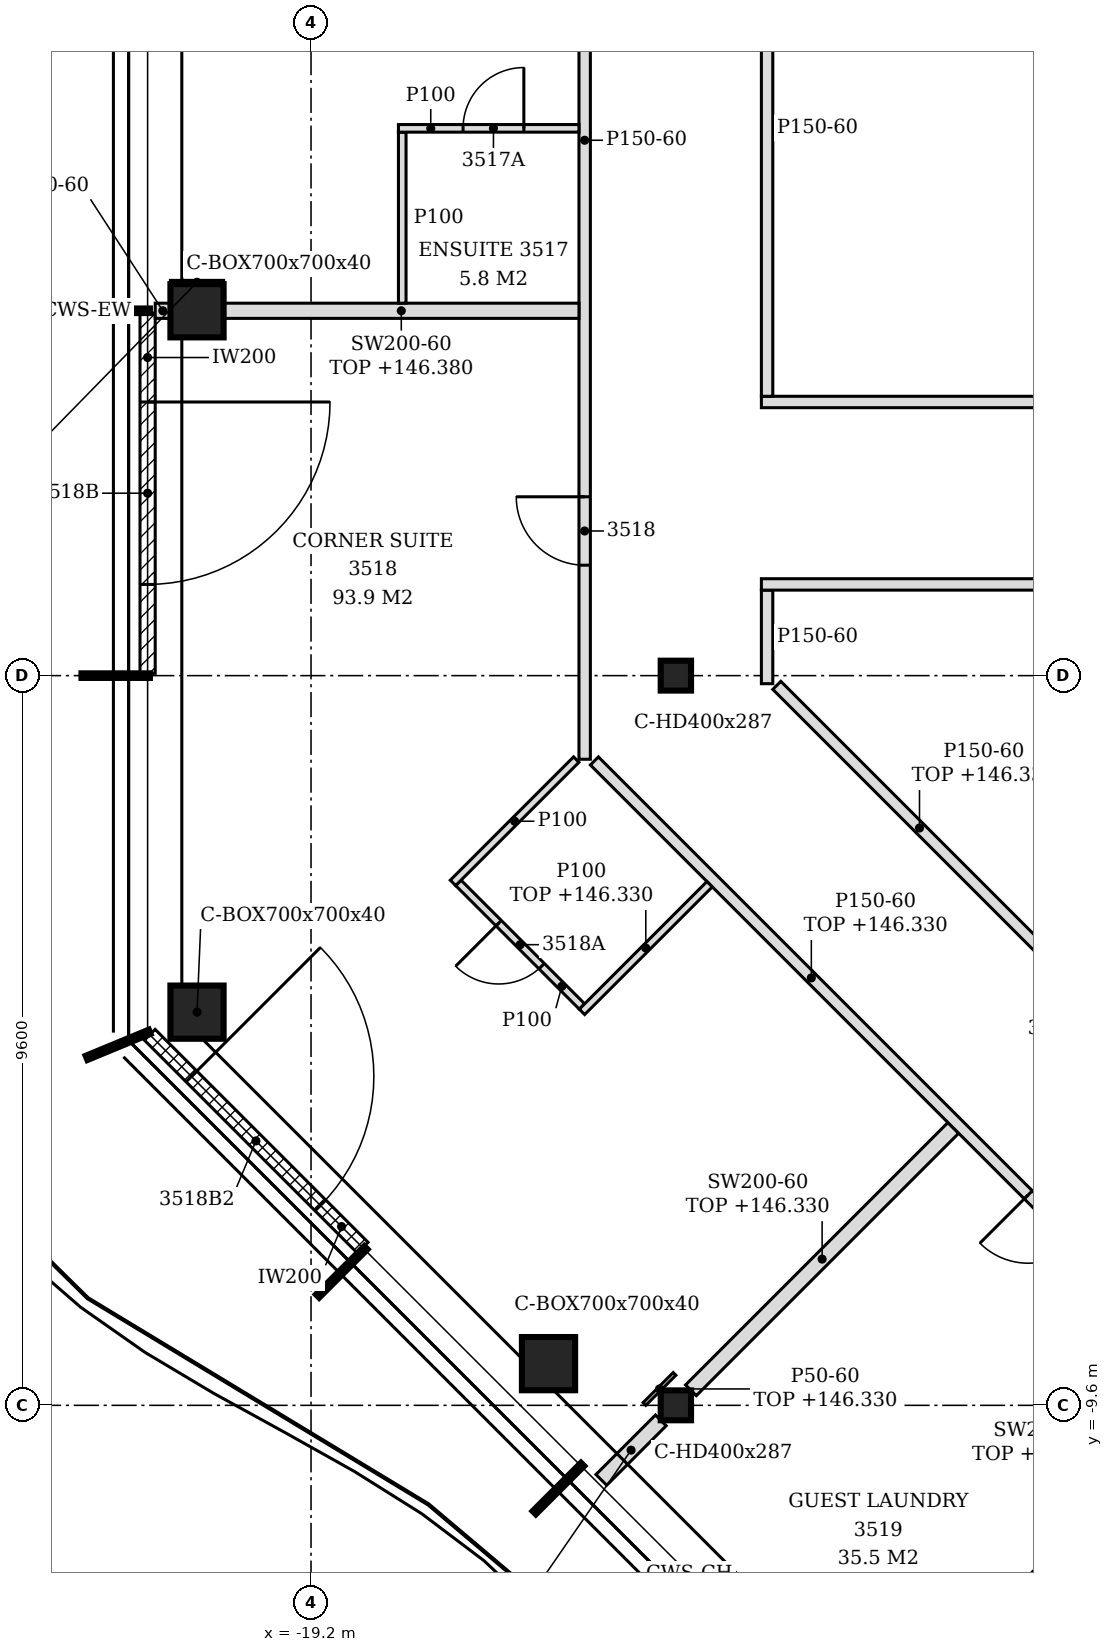
"""IFC4 building model, lengths in metres.
Left out: names, types, materials, properties, quantities, classifications, styles, units other than length and angle.
Written with IfcOpenShell. Run it as: python <this file> out.ifc"""

import sys

from ifc_helpers import new_model, si_unit, direction, frame, frame_2d, origin, origin_2d, place, context, subcontext, project, spatial, polyline, rectangle, hollow_rectangle, i_section, outline, extrude, element, fill, save


model = new_model("IFC4")
c1 = context("Model", 3, precision=1e-05, world=origin(), true_north=direction((0.0, 1.0)))
c2 = subcontext(c1, "Body", "Model", "MODEL_VIEW")
j1 = project(units=[si_unit("LENGTHUNIT", "METRE"), si_unit("PLANEANGLEUNIT", "RADIAN")], contexts=[c1])
p1 = place(None, origin())
s1 = spatial("IfcSite", under=j1, at=p1, CompositionType="ELEMENT")
p2 = place(p1, origin())
s2 = spatial("IfcBuilding", under=s1, at=p2, CompositionType="ELEMENT")
p3 = place(p2, frame((0.0, 0.0, 143.4)))
s3 = spatial("IfcBuildingStorey", under=s2, at=p3, CompositionType="ELEMENT", Elevation=143.4)
for number, where, z_axis, x_axis in (
    (1, (-20.7, 4.8, -0.15), (0.0, 0.0, 1.0), (1.0, 0.0, 0.0)),
    (2, (-20.7, -4.427, -0.15), (0.0, 0.0, 1.0), (1.0, 0.0, 0.0)),
    (3, (-16.076, -9.052, -0.15), (0.0, 0.0, 1.0), (1.0, 0.0, 0.0)),
):
    element("IfcColumn", number, at=place(p3, frame(where, z_axis=z_axis, x_axis=x_axis)), inside=s3, PredefinedType="COLUMN", context=c2, shape_type="SweptSolid", body=[
        extrude(hollow_rectangle(XDim=0.7, YDim=0.7, WallThickness=0.04, at=origin_2d()), origin(), (0.0, 0.0, 1.0), 3.6),
    ])
for number, where, z_axis, x_axis in (
    (4, (-14.4, -9.6, -0.15), (0.0, 0.0, 1.0), (1.0, 0.0, 0.0)),
    (5, (-14.4, 0.0, -0.15), (0.0, 0.0, 1.0), (1.0, 0.0, 0.0)),
):
    element("IfcColumn", number, at=place(p3, frame(where, z_axis=z_axis, x_axis=x_axis)), inside=s3, PredefinedType="COLUMN", context=c2, shape_type="SweptSolid", body=[
        extrude(i_section(OverallWidth=0.399, OverallDepth=0.393, WebThickness=0.023, FlangeThickness=0.037, FilletRadius=0.015, at=origin_2d()), origin(), (0.0, 0.0, 1.0), 3.6),
    ])
p4 = place(p3, frame((-21.35, 4.77, 0.0), z_axis=(0.0, 0.0, 1.0), x_axis=(0.0, -1.0, 0.0)))
e6 = element("IfcWall", 6, at=p4, inside=s3, PredefinedType="NOTDEFINED", context=c2, shape_type="SweptSolid", body=[
    extrude(rectangle(XDim=4.74, YDim=0.2, at=frame_2d((2.37, 0.0))), origin(), (0.0, 0.0, 1.0), 3.45),
])
p5 = place(p4, frame((1.17, 0.0, 0.0)))
e7 = element("IfcOpeningElement", 7, at=p5, cuts=e6, PredefinedType="OPENING", context=c2, shape_type="SweptSolid", body=[
    extrude(rectangle(XDim=2.4, YDim=2.4, at=frame_2d((1.2, 1.2))), frame((0.0, 0.11, 0.0), z_axis=(0.0, -1.0, 0.0), x_axis=(1.0, 0.0, 0.0)), (0.0, 0.0, 1.0), 0.22),
])
p6 = place(p3, frame((-21.322, -4.725, 0.0), z_axis=(0.0, 0.0, 1.0), x_axis=(0.707106781187, -0.707106781187, 0.0)))
e8 = element("IfcWall", 8, at=p6, inside=s3, PredefinedType="NOTDEFINED", context=c2, shape_type="SweptSolid", body=[
    extrude(rectangle(XDim=3.962, YDim=0.2, at=frame_2d((1.981, 0.0))), origin(), (0.0, 0.0, 1.0), 3.45),
])
p7 = place(p6, frame((0.775, 0.0, 0.0)))
e9 = element("IfcOpeningElement", 9, at=p7, cuts=e8, PredefinedType="OPENING", context=c2, shape_type="SweptSolid", body=[
    extrude(rectangle(XDim=2.4, YDim=2.4, at=frame_2d((1.2, 1.2))), frame((0.0, 0.11, 0.0), z_axis=(0.0, -1.0, 0.0), x_axis=(1.0, 0.0, 0.0)), (0.0, 0.0, 1.0), 0.22),
])
p8 = place(p3, frame((-11.102, -13.326, 0.0), z_axis=(0.0, 0.0, 1.0), x_axis=(0.707088722709, 0.707124839203, 0.0)))
e10 = element("IfcWall", 10, at=p8, inside=s3, PredefinedType="PARTITIONING", context=c2, shape_type="SweptSolid", body=[
    extrude(rectangle(XDim=6.76, YDim=0.2, at=frame_2d((3.38, 0.0))), origin(), (0.0, 0.0, 1.0), 2.93),
])
p9 = place(p3, frame((-15.381, -10.581, 0.0), z_axis=(0.0, 0.0, 1.0), x_axis=(0.707217034054, 0.706996511125, 0.0)))
e11 = element("IfcWall", 11, at=p9, inside=s3, PredefinedType="PARTITIONING", context=c2, shape_type="SweptSolid", body=[
    extrude(rectangle(XDim=1.107, YDim=0.2, at=frame_2d((0.554, 0.0))), origin(), (0.0, 0.0, 1.0), 2.63),
])
p10 = place(p3, frame((-14.202, -9.402, 0.0), z_axis=(0.0, 0.0, 1.0), x_axis=(0.707081776084, 0.707131785404, 0.0)))
e12 = element("IfcWall", 12, at=p10, inside=s3, PredefinedType="PARTITIONING", context=c2, shape_type="SweptSolid", body=[
    extrude(rectangle(XDim=4.882, YDim=0.2, at=frame_2d((2.441, 0.0))), origin(), (0.0, 0.0, 1.0), 2.93),
])
p11 = place(p3, frame((-8.322, -8.272, 0.0), z_axis=(0.0, 0.0, 1.0), x_axis=(-0.707106781187, 0.707106781187, 0.0)))
e13 = element("IfcWall", 13, at=p11, inside=s3, PredefinedType="PARTITIONING", context=c2, shape_type="SweptSolid", body=[
    extrude(rectangle(XDim=10.112, YDim=0.15, at=frame_2d((5.056, 0.0))), origin(), (0.0, 0.0, 1.0), 2.93),
])
p12 = place(p11, frame((1.139, 0.0, 0.0)))
e14 = element("IfcOpeningElement", 14, at=p12, cuts=e13, PredefinedType="OPENING", context=c2, shape_type="SweptSolid", body=[
    extrude(rectangle(XDim=0.9, YDim=2.1, at=frame_2d((0.45, 1.05))), frame((0.0, 0.085, 0.0), z_axis=(0.0, -1.0, 0.0), x_axis=(1.0, 0.0, 0.0)), (0.0, 0.0, 1.0), 0.17),
])
p13 = place(p3, frame((-5.009, -8.191, 0.0), z_axis=(0.0, 0.0, 1.0), x_axis=(-0.707106781187, 0.707106781187, 0.0)))
e15 = element("IfcWall", 15, at=p13, inside=s3, PredefinedType="PARTITIONING", context=c2, shape_type="SweptSolid", body=[
    extrude(rectangle(XDim=11.404, YDim=0.15, at=frame_2d((5.702, 0.0))), origin(), (0.0, 0.0, 1.0), 2.93),
])
p14 = place(p13, frame((5.195, 0.0, 0.0)))
e16 = element("IfcOpeningElement", 16, at=p14, cuts=e15, PredefinedType="OPENING", context=c2, shape_type="SweptSolid", body=[
    extrude(rectangle(XDim=0.9, YDim=2.1, at=frame_2d((0.45, 1.05))), frame((0.0, 0.085, 0.0), z_axis=(0.0, -1.0, 0.0), x_axis=(1.0, 0.0, 0.0)), (0.0, 0.0, 1.0), 0.17),
])
p15 = place(p3, frame((-15.635, -4.353, 0.0), z_axis=(0.0, 0.0, 1.0), x_axis=(-0.707106781187, 0.707106781187, 0.0)))
e17 = element("IfcWall", 17, at=p15, inside=s3, PredefinedType="PARTITIONING", context=c2, shape_type="SweptSolid", body=[
    extrude(rectangle(XDim=2.3, YDim=0.1, at=frame_2d((1.15, 0.0))), origin(), (0.0, 0.0, 1.0), 3.45),
])
p16 = place(p15, frame((0.75, 0.0, 0.0)))
e18 = element("IfcOpeningElement", 18, at=p16, cuts=e17, PredefinedType="OPENING", context=c2, shape_type="SweptSolid", body=[
    extrude(rectangle(XDim=0.8, YDim=2.1, at=frame_2d((0.4, 1.05))), frame((0.0, 0.06, 0.0), z_axis=(0.0, -1.0, 0.0), x_axis=(1.0, 0.0, 0.0)), (0.0, 0.0, 1.0), 0.12),
])
p17 = place(p3, frame((-15.635, -4.423, 0.0), z_axis=(0.0, 0.0, 1.0), x_axis=(0.707106781187, 0.707106781187, 0.0)))
e19 = element("IfcWall", 19, at=p17, inside=s3, PredefinedType="PARTITIONING", context=c2, shape_type="SweptSolid", body=[
    extrude(rectangle(XDim=2.375, YDim=0.1, at=frame_2d((1.188, 0.0))), origin(), (0.0, 0.0, 1.0), 2.93),
])
p18 = place(p3, frame((-17.333, -2.726, 0.0), z_axis=(0.0, 0.0, 1.0), x_axis=(0.707159989116, 0.707053569253, 0.0)))
e20 = element("IfcWall", 20, at=p18, inside=s3, PredefinedType="PARTITIONING", context=c2, shape_type="SweptSolid", body=[
    extrude(rectangle(XDim=2.294, YDim=0.1, at=frame_2d((1.147, 0.0))), origin(), (0.0, 0.0, 1.0), 3.45),
])
p19 = place(p3, frame((-15.6, -1.1, 0.0), z_axis=(0.0, 0.0, 1.0), x_axis=(0.0, 1.0, 0.0)))
e21 = element("IfcWall", 21, at=p19, inside=s3, PredefinedType="PARTITIONING", context=c2, shape_type="SweptSolid", body=[
    extrude(outline(polyline([(0.0, 0.0), (12.834, 0.0), (12.834, 3.45), (10.795, 3.45), (10.793, 2.98), (10.605, 2.98), (10.603, 3.45), (5.995, 3.45), (5.993, 2.98), (5.805, 2.98), (5.803, 3.45), (1.195, 3.45), (1.193, 2.98), (1.005, 2.98), (1.003, 3.45), (0.0, 3.45), (0.0, 0.0)])), frame((0.0, 0.075, 0.0), z_axis=(0.0, -1.0, 0.0), x_axis=(1.0, 0.0, 0.0)), (0.0, 0.0, 1.0), 0.15),
])
p20 = place(p19, frame((2.553, 0.0, 0.0)))
e22 = element("IfcOpeningElement", 22, at=p20, cuts=e21, PredefinedType="OPENING", context=c2, shape_type="SweptSolid", body=[
    extrude(rectangle(XDim=0.9, YDim=2.1, at=frame_2d((0.45, 1.05))), frame((0.0, 0.085, 0.0), z_axis=(0.0, -1.0, 0.0), x_axis=(1.0, 0.0, 0.0)), (0.0, 0.0, 1.0), 0.17),
])
p21 = place(p3, frame((-13.2, -0.106, 0.0), z_axis=(0.0, 0.0, 1.0), x_axis=(0.0, 1.0, 0.0)))
e23 = element("IfcWall", 23, at=p21, inside=s3, PredefinedType="PARTITIONING", context=c2, shape_type="SweptSolid", body=[
    extrude(outline(polyline([(0.0, 0.0), (1.231, 0.0), (1.231, 3.45), (0.206, 3.45), (0.204, 2.93), (0.006, 2.93), (0.004, 3.45), (0.0, 3.45), (0.0, 0.0)])), frame((0.0, 0.075, 0.0), z_axis=(0.0, -1.0, 0.0), x_axis=(1.0, 0.0, 0.0)), (0.0, 0.0, 1.0), 0.15),
])
for number, where, z_axis, x_axis in (
    (24, (-13.275, 1.2, 0.0), (0.0, 0.0, 1.0), (1.0, 0.0, 0.0)),
    (25, (-13.275, 3.6, 0.0), (0.0, 0.0, 1.0), (1.0, 0.0, 0.0)),
):
    element("IfcWall", number, at=place(p3, frame(where, z_axis=z_axis, x_axis=x_axis)), inside=s3, PredefinedType="PARTITIONING", context=c2, shape_type="SweptSolid", body=[
        extrude(outline(polyline([(0.0, 0.0), (8.55, 0.0), (8.55, 2.83), (8.325, 2.83), (8.323, 3.45), (0.0, 3.45), (0.0, 0.0)])), frame((0.0, 0.075, 0.0), z_axis=(0.0, -1.0, 0.0), x_axis=(1.0, 0.0, 0.0)), (0.0, 0.0, 1.0), 0.15),
    ])
p22 = place(p3, frame((-13.2, 3.675, 0.0), z_axis=(0.0, 0.0, 1.0), x_axis=(0.0, 1.0, 0.0)))
e26 = element("IfcWall", 26, at=p22, inside=s3, PredefinedType="PARTITIONING", context=c2, shape_type="SweptSolid", body=[
    extrude(outline(polyline([(0.0, 0.0), (7.065, 0.0), (7.065, 3.45), (6.025, 3.45), (6.023, 2.93), (5.825, 2.93), (5.823, 3.45), (1.225, 3.45), (1.223, 2.93), (1.025, 2.93), (1.023, 3.45), (0.0, 3.45), (0.0, 0.0)])), frame((0.0, 0.075, 0.0), z_axis=(0.0, -1.0, 0.0), x_axis=(1.0, 0.0, 0.0)), (0.0, 0.0, 1.0), 0.15),
])
p23 = place(p3, frame((-21.25, 4.8, 0.0), z_axis=(0.0, 0.0, 1.0), x_axis=(1.0, 0.0, 0.0)))
e27 = element("IfcWall", 27, at=p23, inside=s3, PredefinedType="PARTITIONING", context=c2, shape_type="SweptSolid", body=[
    extrude(rectangle(XDim=0.2, YDim=0.2, at=frame_2d((0.1, 0.0))), origin(), (0.0, 0.0, 1.0), 3.45),
])
p24 = place(p3, frame((-20.35, 4.8, 0.0), z_axis=(0.0, 0.0, 1.0), x_axis=(1.0, 0.0, 0.0)))
e28 = element("IfcWall", 28, at=p24, inside=s3, PredefinedType="PARTITIONING", context=c2, shape_type="SweptSolid", body=[
    extrude(rectangle(XDim=4.675, YDim=0.2, at=frame_2d((2.337, 0.0))), origin(), (0.0, 0.0, 1.0), 2.98),
])
p25 = place(p3, frame((-18.0, 4.9, 0.0), z_axis=(0.0, 0.0, 1.0), x_axis=(0.0, 1.0, 0.0)))
e29 = element("IfcWall", 29, at=p25, inside=s3, PredefinedType="PARTITIONING", context=c2, shape_type="SweptSolid", body=[
    extrude(rectangle(XDim=2.25, YDim=0.1, at=frame_2d((1.125, 0.0))), origin(), (0.0, 0.0, 1.0), 3.45),
])
p26 = place(p3, frame((-18.05, 7.2, 0.0), z_axis=(0.0, 0.0, 1.0), x_axis=(1.0, 0.0, 0.0)))
e30 = element("IfcWall", 30, at=p26, inside=s3, PredefinedType="PARTITIONING", context=c2, shape_type="SweptSolid", body=[
    extrude(rectangle(XDim=2.375, YDim=0.1, at=frame_2d((1.188, 0.0))), origin(), (0.0, 0.0, 1.0), 3.45),
])
p27 = place(p26, frame((0.85, 0.0, 0.0)))
e31 = element("IfcOpeningElement", 31, at=p27, cuts=e30, PredefinedType="OPENING", context=c2, shape_type="SweptSolid", body=[
    extrude(rectangle(XDim=0.8, YDim=2.1, at=frame_2d((0.4, 1.05))), frame((0.0, 0.06, 0.0), z_axis=(0.0, -1.0, 0.0), x_axis=(1.0, 0.0, 0.0)), (0.0, 0.0, 1.0), 0.12),
])
p28 = place(p3, frame((-14.814, -9.582, 0.0), z_axis=(0.0, 0.0, 1.0), x_axis=(0.707106781187, 0.707106781187, 0.0)))
e32 = element("IfcWall", 32, at=p28, inside=s3, PredefinedType="PARTITIONING", context=c2, shape_type="SweptSolid", body=[
    extrude(rectangle(XDim=0.56, YDim=0.05, at=frame_2d((0.28, 0.0))), origin(), (0.0, 0.0, 1.0), 2.93),
])
p29 = place(p3, frame((-21.05, 5.175, 0.0), z_axis=(0.0, 0.0, 1.0), x_axis=(1.0, 0.0, 0.0)))
e33 = element("IfcWall", 33, at=p29, inside=s3, PredefinedType="PARTITIONING", context=c2, shape_type="SweptSolid", body=[
    extrude(rectangle(XDim=0.7, YDim=0.05, at=frame_2d((0.35, 0.0))), origin(), (0.0, 0.0, 1.0), 2.93),
])
p30 = place(p5, origin())
e34 = element("IfcDoor", 34, at=p30, inside=s3, OperationType="SINGLE_SWING_LEFT", PredefinedType="DOOR", context=c2, shape_type="SweptSolid", body=[
    extrude(rectangle(XDim=2.4, YDim=2.4, at=frame_2d((1.2, 1.2))), frame((0.0, 0.025, 0.0), z_axis=(0.0, -1.0, 0.0), x_axis=(1.0, 0.0, 0.0)), (0.0, 0.0, 1.0), 0.05),
])
fill(e7, e34)
p31 = place(p7, origin())
e35 = element("IfcDoor", 35, at=p31, inside=s3, OperationType="SINGLE_SWING_LEFT", PredefinedType="DOOR", context=c2, shape_type="SweptSolid", body=[
    extrude(rectangle(XDim=2.4, YDim=2.4, at=frame_2d((1.2, 1.2))), frame((0.0, 0.025, 0.0), z_axis=(0.0, -1.0, 0.0), x_axis=(1.0, 0.0, 0.0)), (0.0, 0.0, 1.0), 0.05),
])
fill(e9, e35)
p32 = place(p27, origin())
e36 = element("IfcDoor", 36, at=p32, inside=s3, OperationType="SINGLE_SWING_RIGHT", PredefinedType="DOOR", context=c2, shape_type="SweptSolid", body=[
    extrude(rectangle(XDim=0.8, YDim=2.1, at=frame_2d((0.4, 1.05))), frame((0.0, 0.025, 0.0), z_axis=(0.0, -1.0, 0.0), x_axis=(1.0, 0.0, 0.0)), (0.0, 0.0, 1.0), 0.05),
])
fill(e31, e36)
p33 = place(p20, origin())
e37 = element("IfcDoor", 37, at=p33, inside=s3, OperationType="SINGLE_SWING_RIGHT", PredefinedType="DOOR", context=c2, shape_type="SweptSolid", body=[
    extrude(rectangle(XDim=0.9, YDim=2.1, at=frame_2d((0.45, 1.05))), frame((0.0, 0.025, 0.0), z_axis=(0.0, -1.0, 0.0), x_axis=(1.0, 0.0, 0.0)), (0.0, 0.0, 1.0), 0.05),
])
fill(e22, e37)
p34 = place(p16, origin())
e38 = element("IfcDoor", 38, at=p34, inside=s3, OperationType="SINGLE_SWING_RIGHT", PredefinedType="DOOR", context=c2, shape_type="SweptSolid", body=[
    extrude(rectangle(XDim=0.8, YDim=2.1, at=frame_2d((0.4, 1.05))), frame((0.0, 0.025, 0.0), z_axis=(0.0, -1.0, 0.0), x_axis=(1.0, 0.0, 0.0)), (0.0, 0.0, 1.0), 0.05),
])
fill(e18, e38)
p35 = place(p12, origin())
e39 = element("IfcDoor", 39, at=p35, inside=s3, OperationType="SINGLE_SWING_RIGHT", PredefinedType="DOOR", context=c2, shape_type="SweptSolid", body=[
    extrude(rectangle(XDim=0.9, YDim=2.1, at=frame_2d((0.45, 1.05))), frame((0.0, 0.025, 0.0), z_axis=(0.0, -1.0, 0.0), x_axis=(1.0, 0.0, 0.0)), (0.0, 0.0, 1.0), 0.05),
])
fill(e14, e39)
save(model, sys.argv[1])
